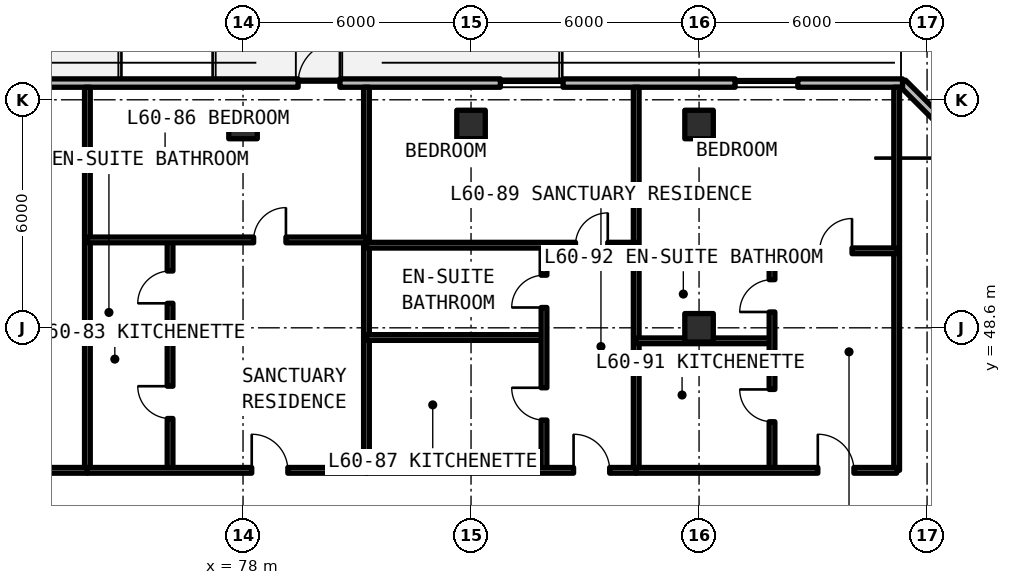
"""IFC4 building model, lengths in metres.
Left out: names, types, materials, properties, quantities, classifications, styles, units other than length and angle.
Written with IfcOpenShell. Run it as: python <this file> out.ifc"""

import sys

from ifc_helpers import new_model, si_unit, direction, frame, frame_2d, origin, origin_2d, place, context, subcontext, project, spatial, rectangle, extrude, element, fill, save


model = new_model("IFC4")
c1 = context("Model", 3, precision=1e-05, world=origin(), true_north=direction((0.0, 1.0)))
c2 = subcontext(c1, "Body", "Model", "MODEL_VIEW")
j1 = project(units=[si_unit("LENGTHUNIT", "METRE"), si_unit("PLANEANGLEUNIT", "RADIAN")], contexts=[c1])
p1 = place(None, origin())
s1 = spatial("IfcSite", under=j1, at=p1, CompositionType="ELEMENT")
p2 = place(p1, origin())
s2 = spatial("IfcBuilding", under=s1, at=p2, CompositionType="ELEMENT")
p3 = place(p2, frame((0.0, 0.0, 215.49)))
s3 = spatial("IfcBuildingStorey", under=s2, at=p3, CompositionType="ELEMENT", Elevation=215.49)
for number, where, z_axis, x_axis in (
    (1, (90.0, 48.6, 0.0), (0.0, 0.0, 1.0), (1.0, 0.0, 0.0)),
    (2, (78.0, 53.95, 0.0), (0.0, 0.0, 1.0), (1.0, 0.0, 0.0)),
    (3, (84.0, 53.95, 0.0), (0.0, 0.0, 1.0), (1.0, 0.0, 0.0)),
    (4, (90.0, 53.95, 0.0), (0.0, 0.0, 1.0), (1.0, 0.0, 0.0)),
):
    element("IfcColumn", number, at=place(p3, frame(where, z_axis=z_axis, x_axis=x_axis)), inside=s3, PredefinedType="COLUMN", context=c2, shape_type="SweptSolid", body=[
        extrude(rectangle(XDim=0.75, YDim=0.75, at=origin_2d()), origin(), (0.0, 0.0, 1.0), 3.63),
    ])
p4 = place(p3, frame((99.49, 50.904, 0.0), z_axis=(0.0, 0.0, 1.0), x_axis=(-0.707085909342, 0.707127652415, 0.0)))
e5 = element("IfcWall", 5, at=p4, inside=s3, PredefinedType="SOLIDWALL", context=c2, shape_type="SweptSolid", body=[
    extrude(rectangle(XDim=5.849, YDim=0.22, at=frame_2d((2.924, 0.0))), origin(), (0.0, 0.0, 1.0), 3.41),
])
p5 = place(p4, frame((1.224, 0.0, 0.78)))
e6 = element("IfcOpeningElement", 6, at=p5, cuts=e5, PredefinedType="OPENING", context=c2, shape_type="SweptSolid", body=[
    extrude(rectangle(XDim=3.4, YDim=1.66, at=frame_2d((1.7, 0.83))), frame((0.0, 0.12, 0.0), z_axis=(0.0, -1.0, 0.0), x_axis=(1.0, 0.0, 0.0)), (0.0, 0.0, 1.0), 0.24),
])
p6 = place(p3, frame((95.354, 55.04, 0.0), z_axis=(0.0, 0.0, 1.0), x_axis=(-1.0, 0.0, 0.0)))
e7 = element("IfcWall", 7, at=p6, inside=s3, PredefinedType="SOLIDWALL", context=c2, shape_type="SweptSolid", body=[
    extrude(rectangle(XDim=43.244, YDim=0.22, at=frame_2d((21.622, 0.0))), origin(), (0.0, 0.0, 1.0), 3.41),
])
p7 = place(p6, frame((37.204, 0.0, 0.0)))
e8 = element("IfcOpeningElement", 8, at=p7, cuts=e7, PredefinedType="OPENING", context=c2, shape_type="SweptSolid", body=[
    extrude(rectangle(XDim=1.1, YDim=2.15, at=frame_2d((0.55, 1.075))), frame((0.0, 0.12, 0.0), z_axis=(0.0, -1.0, 0.0), x_axis=(1.0, 0.0, 0.0)), (0.0, 0.0, 1.0), 0.24),
])
p8 = place(p6, frame((25.104, 0.0, 0.0)))
e9 = element("IfcOpeningElement", 9, at=p8, cuts=e7, PredefinedType="OPENING", context=c2, shape_type="SweptSolid", body=[
    extrude(rectangle(XDim=1.1, YDim=2.15, at=frame_2d((0.55, 1.075))), frame((0.0, 0.12, 0.0), z_axis=(0.0, -1.0, 0.0), x_axis=(1.0, 0.0, 0.0)), (0.0, 0.0, 1.0), 0.24),
])
p9 = place(p6, frame((14.804, 0.0, 0.0)))
e10 = element("IfcOpeningElement", 10, at=p9, cuts=e7, PredefinedType="OPENING", context=c2, shape_type="SweptSolid", body=[
    extrude(rectangle(XDim=1.1, YDim=2.15, at=frame_2d((0.55, 1.075))), frame((0.0, 0.12, 0.0), z_axis=(0.0, -1.0, 0.0), x_axis=(1.0, 0.0, 0.0)), (0.0, 0.0, 1.0), 0.24),
])
p10 = place(p6, frame((31.517, 0.0, 0.78)))
e11 = element("IfcOpeningElement", 11, at=p10, cuts=e7, PredefinedType="OPENING", context=c2, shape_type="SweptSolid", body=[
    extrude(rectangle(XDim=1.65, YDim=1.66, at=frame_2d((0.825, 0.83))), frame((0.0, 0.12, 0.0), z_axis=(0.0, -1.0, 0.0), x_axis=(1.0, 0.0, 0.0)), (0.0, 0.0, 1.0), 0.24),
])
p11 = place(p6, frame((8.932, 0.0, 0.78)))
e12 = element("IfcOpeningElement", 12, at=p11, cuts=e7, PredefinedType="OPENING", context=c2, shape_type="SweptSolid", body=[
    extrude(rectangle(XDim=1.65, YDim=1.66, at=frame_2d((0.825, 0.83))), frame((0.0, 0.12, 0.0), z_axis=(0.0, -1.0, 0.0), x_axis=(1.0, 0.0, 0.0)), (0.0, 0.0, 1.0), 0.24),
])
p12 = place(p6, frame((2.756, 0.0, 0.78)))
e13 = element("IfcOpeningElement", 13, at=p12, cuts=e7, PredefinedType="OPENING", context=c2, shape_type="SweptSolid", body=[
    extrude(rectangle(XDim=1.65, YDim=1.66, at=frame_2d((0.825, 0.83))), frame((0.0, 0.12, 0.0), z_axis=(0.0, -1.0, 0.0), x_axis=(1.0, 0.0, 0.0)), (0.0, 0.0, 1.0), 0.24),
])
for number, where, z_axis, x_axis in (
    (14, (95.2, 44.85, 0.0), (0.0, 0.0, 1.0), (0.0, 1.0, 0.0)),
    (15, (73.905, 44.85, 0.0), (0.0, 0.0, 1.0), (0.0, 1.0, 0.0)),
):
    element("IfcWall", number, at=place(p3, frame(where, z_axis=z_axis, x_axis=x_axis)), inside=s3, PredefinedType="SOLIDWALL", context=c2, shape_type="SweptSolid", body=[
        extrude(rectangle(XDim=10.08, YDim=0.15, at=frame_2d((5.04, 0.0))), origin(), (0.0, 0.0, 1.0), 2.63),
    ])
p13 = place(p3, frame((66.806, 44.85, 0.0), z_axis=(0.0, 0.0, 1.0), x_axis=(1.0, 0.0, 0.0)))
e16 = element("IfcWall", 16, at=p13, inside=s3, PredefinedType="SOLIDWALL", context=c2, shape_type="SweptSolid", body=[
    extrude(rectangle(XDim=7.098, YDim=0.15, at=frame_2d((3.549, 0.0))), origin(), (0.0, 0.0, 1.0), 2.63),
])
p14 = place(p13, frame((2.999, 0.0, 0.0)))
e17 = element("IfcOpeningElement", 17, at=p14, cuts=e16, PredefinedType="OPENING", context=c2, shape_type="SweptSolid", body=[
    extrude(rectangle(XDim=1.1, YDim=2.15, at=frame_2d((0.55, 1.075))), frame((0.0, 0.085, 0.0), z_axis=(0.0, -1.0, 0.0), x_axis=(1.0, 0.0, 0.0)), (0.0, 0.0, 1.0), 0.17),
])
p15 = place(p3, frame((81.248, 44.85, 0.0), z_axis=(0.0, 0.0, 1.0), x_axis=(0.0, 1.0, 0.0)))
e18 = element("IfcWall", 18, at=p15, inside=s3, PredefinedType="SOLIDWALL", context=c2, shape_type="SweptSolid", body=[
    extrude(rectangle(XDim=10.08, YDim=0.15, at=frame_2d((5.04, 0.0))), origin(), (0.0, 0.0, 1.0), 2.63),
])
p16 = place(p3, frame((73.905, 48.427, 0.0), z_axis=(0.0, 0.0, 1.0), x_axis=(1.0, 0.0, 0.0)))
e19 = element("IfcWall", 19, at=p16, inside=s3, PredefinedType="PARTITIONING", context=c2, shape_type="SweptSolid", body=[
    extrude(rectangle(XDim=2.175, YDim=0.15, at=frame_2d((1.088, 0.0))), origin(), (0.0, 0.0, 1.0), 2.63),
])
p17 = place(p3, frame((76.08, 44.85, 0.0), z_axis=(0.0, 0.0, 1.0), x_axis=(0.0, 1.0, 0.0)))
e20 = element("IfcWall", 20, at=p17, inside=s3, PredefinedType="PARTITIONING", context=c2, shape_type="SweptSolid", body=[
    extrude(rectangle(XDim=6.062, YDim=0.15, at=frame_2d((3.031, 0.0))), origin(), (0.0, 0.0, 1.0), 2.63),
])
p18 = place(p17, frame((1.364, 0.0, 0.0)))
e21 = element("IfcOpeningElement", 21, at=p18, cuts=e20, PredefinedType="OPENING", context=c2, shape_type="SweptSolid", body=[
    extrude(rectangle(XDim=0.85, YDim=2.1, at=frame_2d((0.425, 1.05))), frame((0.0, 0.085, 0.0), z_axis=(0.0, -1.0, 0.0), x_axis=(1.0, 0.0, 0.0)), (0.0, 0.0, 1.0), 0.17),
])
p19 = place(p17, frame((4.395, 0.0, 0.0)))
e22 = element("IfcOpeningElement", 22, at=p19, cuts=e20, PredefinedType="OPENING", context=c2, shape_type="SweptSolid", body=[
    extrude(rectangle(XDim=0.85, YDim=2.1, at=frame_2d((0.425, 1.05))), frame((0.0, 0.085, 0.0), z_axis=(0.0, -1.0, 0.0), x_axis=(1.0, 0.0, 0.0)), (0.0, 0.0, 1.0), 0.17),
])
p20 = place(p3, frame((73.905, 50.913, 0.0), z_axis=(0.0, 0.0, 1.0), x_axis=(1.0, 0.0, 0.0)))
e23 = element("IfcWall", 23, at=p20, inside=s3, PredefinedType="PARTITIONING", context=c2, shape_type="SweptSolid", body=[
    extrude(rectangle(XDim=7.343, YDim=0.15, at=frame_2d((3.672, 0.0))), origin(), (0.0, 0.0, 1.0), 2.63),
])
p21 = place(p20, frame((4.374, 0.0, 0.0)))
e24 = element("IfcOpeningElement", 24, at=p21, cuts=e23, PredefinedType="OPENING", context=c2, shape_type="SweptSolid", body=[
    extrude(rectangle(XDim=0.85, YDim=2.1, at=frame_2d((0.425, 1.05))), frame((0.0, 0.085, 0.0), z_axis=(0.0, -1.0, 0.0), x_axis=(1.0, 0.0, 0.0)), (0.0, 0.0, 1.0), 0.17),
])
p22 = place(p3, frame((73.905, 44.85, 0.0), z_axis=(0.0, 0.0, 1.0), x_axis=(1.0, 0.0, 0.0)))
e25 = element("IfcWall", 25, at=p22, inside=s3, PredefinedType="SOLIDWALL", context=c2, shape_type="SweptSolid", body=[
    extrude(rectangle(XDim=7.343, YDim=0.15, at=frame_2d((3.672, 0.0))), origin(), (0.0, 0.0, 1.0), 2.63),
])
p23 = place(p22, frame((4.324, 0.0, 0.0)))
e26 = element("IfcOpeningElement", 26, at=p23, cuts=e25, PredefinedType="OPENING", context=c2, shape_type="SweptSolid", body=[
    extrude(rectangle(XDim=0.95, YDim=2.15, at=frame_2d((0.475, 1.075))), frame((0.0, 0.085, 0.0), z_axis=(0.0, -1.0, 0.0), x_axis=(1.0, 0.0, 0.0)), (0.0, 0.0, 1.0), 0.17),
])
p24 = place(p3, frame((88.346, 44.85, 0.0), z_axis=(0.0, 0.0, 1.0), x_axis=(0.0, 1.0, 0.0)))
e27 = element("IfcWall", 27, at=p24, inside=s3, PredefinedType="SOLIDWALL", context=c2, shape_type="SweptSolid", body=[
    extrude(rectangle(XDim=10.08, YDim=0.15, at=frame_2d((5.04, 0.0))), origin(), (0.0, 0.0, 1.0), 2.63),
])
p25 = place(p3, frame((81.248, 48.345, 0.0), z_axis=(0.0, 0.0, 1.0), x_axis=(1.0, 0.0, 0.0)))
e28 = element("IfcWall", 28, at=p25, inside=s3, PredefinedType="PARTITIONING", context=c2, shape_type="SweptSolid", body=[
    extrude(rectangle(XDim=4.672, YDim=0.15, at=frame_2d((2.336, 0.0))), origin(), (0.0, 0.0, 1.0), 2.63),
])
p26 = place(p3, frame((85.92, 44.85, 0.0), z_axis=(0.0, 0.0, 1.0), x_axis=(0.0, 1.0, 0.0)))
e29 = element("IfcWall", 29, at=p26, inside=s3, PredefinedType="PARTITIONING", context=c2, shape_type="SweptSolid", body=[
    extrude(rectangle(XDim=5.924, YDim=0.15, at=frame_2d((2.962, 0.0))), origin(), (0.0, 0.0, 1.0), 2.63),
])
p27 = place(p26, frame((1.323, 0.0, 0.0)))
e30 = element("IfcOpeningElement", 30, at=p27, cuts=e29, PredefinedType="OPENING", context=c2, shape_type="SweptSolid", body=[
    extrude(rectangle(XDim=0.85, YDim=2.1, at=frame_2d((0.425, 1.05))), frame((0.0, 0.085, 0.0), z_axis=(0.0, -1.0, 0.0), x_axis=(1.0, 0.0, 0.0)), (0.0, 0.0, 1.0), 0.17),
])
p28 = place(p26, frame((4.285, 0.0, 0.0)))
e31 = element("IfcOpeningElement", 31, at=p28, cuts=e29, PredefinedType="OPENING", context=c2, shape_type="SweptSolid", body=[
    extrude(rectangle(XDim=0.85, YDim=2.1, at=frame_2d((0.425, 1.05))), frame((0.0, 0.085, 0.0), z_axis=(0.0, -1.0, 0.0), x_axis=(1.0, 0.0, 0.0)), (0.0, 0.0, 1.0), 0.17),
])
p29 = place(p3, frame((81.248, 50.774, 0.0), z_axis=(0.0, 0.0, 1.0), x_axis=(1.0, 0.0, 0.0)))
e32 = element("IfcWall", 32, at=p29, inside=s3, PredefinedType="PARTITIONING", context=c2, shape_type="SweptSolid", body=[
    extrude(rectangle(XDim=7.098, YDim=0.15, at=frame_2d((3.549, 0.0))), origin(), (0.0, 0.0, 1.0), 2.63),
])
p30 = place(p29, frame((5.5, 0.0, 0.0)))
e33 = element("IfcOpeningElement", 33, at=p30, cuts=e32, PredefinedType="OPENING", context=c2, shape_type="SweptSolid", body=[
    extrude(rectangle(XDim=0.85, YDim=2.1, at=frame_2d((0.425, 1.05))), frame((0.0, 0.085, 0.0), z_axis=(0.0, -1.0, 0.0), x_axis=(1.0, 0.0, 0.0)), (0.0, 0.0, 1.0), 0.17),
])
p31 = place(p3, frame((81.248, 44.85, 0.0), z_axis=(0.0, 0.0, 1.0), x_axis=(1.0, 0.0, 0.0)))
e34 = element("IfcWall", 34, at=p31, inside=s3, PredefinedType="SOLIDWALL", context=c2, shape_type="SweptSolid", body=[
    extrude(rectangle(XDim=7.098, YDim=0.15, at=frame_2d((3.549, 0.0))), origin(), (0.0, 0.0, 1.0), 2.63),
])
p32 = place(p31, frame((5.45, 0.0, 0.0)))
e35 = element("IfcOpeningElement", 35, at=p32, cuts=e34, PredefinedType="OPENING", context=c2, shape_type="SweptSolid", body=[
    extrude(rectangle(XDim=0.95, YDim=2.15, at=frame_2d((0.475, 1.075))), frame((0.0, 0.085, 0.0), z_axis=(0.0, -1.0, 0.0), x_axis=(1.0, 0.0, 0.0)), (0.0, 0.0, 1.0), 0.17),
])
p33 = place(p3, frame((88.346, 48.258, 0.0), z_axis=(0.0, 0.0, 1.0), x_axis=(1.0, 0.0, 0.0)))
e36 = element("IfcWall", 36, at=p33, inside=s3, PredefinedType="PARTITIONING", context=c2, shape_type="SweptSolid", body=[
    extrude(rectangle(XDim=3.573, YDim=0.15, at=frame_2d((1.787, 0.0))), origin(), (0.0, 0.0, 1.0), 2.63),
])
p34 = place(p3, frame((91.92, 44.85, 0.0), z_axis=(0.0, 0.0, 1.0), x_axis=(0.0, 1.0, 0.0)))
e37 = element("IfcWall", 37, at=p34, inside=s3, PredefinedType="PARTITIONING", context=c2, shape_type="SweptSolid", body=[
    extrude(rectangle(XDim=5.776, YDim=0.15, at=frame_2d((2.888, 0.0))), origin(), (0.0, 0.0, 1.0), 2.63),
])
p35 = place(p34, frame((1.279, 0.0, 0.0)))
e38 = element("IfcOpeningElement", 38, at=p35, cuts=e37, PredefinedType="OPENING", context=c2, shape_type="SweptSolid", body=[
    extrude(rectangle(XDim=0.85, YDim=2.1, at=frame_2d((0.425, 1.05))), frame((0.0, 0.085, 0.0), z_axis=(0.0, -1.0, 0.0), x_axis=(1.0, 0.0, 0.0)), (0.0, 0.0, 1.0), 0.17),
])
p36 = place(p34, frame((4.167, 0.0, 0.0)))
e39 = element("IfcOpeningElement", 39, at=p36, cuts=e37, PredefinedType="OPENING", context=c2, shape_type="SweptSolid", body=[
    extrude(rectangle(XDim=0.85, YDim=2.1, at=frame_2d((0.425, 1.05))), frame((0.0, 0.085, 0.0), z_axis=(0.0, -1.0, 0.0), x_axis=(1.0, 0.0, 0.0)), (0.0, 0.0, 1.0), 0.17),
])
p37 = place(p3, frame((88.346, 50.626, 0.0), z_axis=(0.0, 0.0, 1.0), x_axis=(1.0, 0.0, 0.0)))
e40 = element("IfcWall", 40, at=p37, inside=s3, PredefinedType="PARTITIONING", context=c2, shape_type="SweptSolid", body=[
    extrude(rectangle(XDim=6.854, YDim=0.15, at=frame_2d((3.427, 0.0))), origin(), (0.0, 0.0, 1.0), 2.63),
])
p38 = place(p37, frame((4.829, 0.0, 0.0)))
e41 = element("IfcOpeningElement", 41, at=p38, cuts=e40, PredefinedType="OPENING", context=c2, shape_type="SweptSolid", body=[
    extrude(rectangle(XDim=0.85, YDim=2.1, at=frame_2d((0.425, 1.05))), frame((0.0, 0.085, 0.0), z_axis=(0.0, -1.0, 0.0), x_axis=(1.0, 0.0, 0.0)), (0.0, 0.0, 1.0), 0.17),
])
p39 = place(p3, frame((88.346, 44.85, 0.0), z_axis=(0.0, 0.0, 1.0), x_axis=(1.0, 0.0, 0.0)))
e42 = element("IfcWall", 42, at=p39, inside=s3, PredefinedType="SOLIDWALL", context=c2, shape_type="SweptSolid", body=[
    extrude(rectangle(XDim=6.854, YDim=0.15, at=frame_2d((3.427, 0.0))), origin(), (0.0, 0.0, 1.0), 2.63),
])
p40 = place(p39, frame((4.779, 0.0, 0.0)))
e43 = element("IfcOpeningElement", 43, at=p40, cuts=e42, PredefinedType="OPENING", context=c2, shape_type="SweptSolid", body=[
    extrude(rectangle(XDim=0.95, YDim=2.15, at=frame_2d((0.475, 1.075))), frame((0.0, 0.085, 0.0), z_axis=(0.0, -1.0, 0.0), x_axis=(1.0, 0.0, 0.0)), (0.0, 0.0, 1.0), 0.17),
])
p41 = place(p9, frame((1.1, 0.0, 0.0), z_axis=(0.0, 0.0, 1.0), x_axis=(-1.0, 0.0, 0.0)))
e44 = element("IfcDoor", 44, at=p41, inside=s3, OperationType="SINGLE_SWING_RIGHT", PredefinedType="DOOR", context=c2, shape_type="SweptSolid", body=[
    extrude(rectangle(XDim=1.1, YDim=2.15, at=frame_2d((0.55, 1.075))), frame((0.0, 0.025, 0.0), z_axis=(0.0, -1.0, 0.0), x_axis=(1.0, 0.0, 0.0)), (0.0, 0.0, 1.0), 0.05),
])
fill(e10, e44)
p42 = place(p11, origin())
e45 = element("IfcWindow", 45, at=p42, inside=s3, PartitioningType="SINGLE_PANEL", PredefinedType="WINDOW", context=c2, shape_type="SweptSolid", body=[
    extrude(rectangle(XDim=1.65, YDim=1.66, at=frame_2d((0.825, 0.83))), frame((0.0, 0.03, 0.0), z_axis=(0.0, -1.0, 0.0), x_axis=(1.0, 0.0, 0.0)), (0.0, 0.0, 1.0), 0.06),
])
fill(e12, e45)
p43 = place(p12, origin())
e46 = element("IfcWindow", 46, at=p43, inside=s3, PartitioningType="SINGLE_PANEL", PredefinedType="WINDOW", context=c2, shape_type="SweptSolid", body=[
    extrude(rectangle(XDim=1.65, YDim=1.66, at=frame_2d((0.825, 0.83))), frame((0.0, 0.03, 0.0), z_axis=(0.0, -1.0, 0.0), x_axis=(1.0, 0.0, 0.0)), (0.0, 0.0, 1.0), 0.06),
])
fill(e13, e46)
p44 = place(p18, origin())
e47 = element("IfcDoor", 47, at=p44, inside=s3, OperationType="SINGLE_SWING_RIGHT", PredefinedType="DOOR", context=c2, shape_type="SweptSolid", body=[
    extrude(rectangle(XDim=0.85, YDim=2.1, at=frame_2d((0.425, 1.05))), frame((0.0, 0.025, 0.0), z_axis=(0.0, -1.0, 0.0), x_axis=(1.0, 0.0, 0.0)), (0.0, 0.0, 1.0), 0.05),
])
fill(e21, e47)
p45 = place(p19, origin())
e48 = element("IfcDoor", 48, at=p45, inside=s3, OperationType="SINGLE_SWING_LEFT", PredefinedType="DOOR", context=c2, shape_type="SweptSolid", body=[
    extrude(rectangle(XDim=0.85, YDim=2.1, at=frame_2d((0.425, 1.05))), frame((0.0, 0.025, 0.0), z_axis=(0.0, -1.0, 0.0), x_axis=(1.0, 0.0, 0.0)), (0.0, 0.0, 1.0), 0.05),
])
fill(e22, e48)
p46 = place(p21, origin())
e49 = element("IfcDoor", 49, at=p46, inside=s3, OperationType="SINGLE_SWING_RIGHT", PredefinedType="DOOR", context=c2, shape_type="SweptSolid", body=[
    extrude(rectangle(XDim=0.85, YDim=2.1, at=frame_2d((0.425, 1.05))), frame((0.0, 0.025, 0.0), z_axis=(0.0, -1.0, 0.0), x_axis=(1.0, 0.0, 0.0)), (0.0, 0.0, 1.0), 0.05),
])
fill(e24, e49)
p47 = place(p23, origin())
e50 = element("IfcDoor", 50, at=p47, inside=s3, OperationType="SINGLE_SWING_LEFT", PredefinedType="DOOR", context=c2, shape_type="SweptSolid", body=[
    extrude(rectangle(XDim=0.95, YDim=2.15, at=frame_2d((0.475, 1.075))), frame((0.0, 0.025, 0.0), z_axis=(0.0, -1.0, 0.0), x_axis=(1.0, 0.0, 0.0)), (0.0, 0.0, 1.0), 0.05),
])
fill(e26, e50)
p48 = place(p27, origin())
e51 = element("IfcDoor", 51, at=p48, inside=s3, OperationType="SINGLE_SWING_RIGHT", PredefinedType="DOOR", context=c2, shape_type="SweptSolid", body=[
    extrude(rectangle(XDim=0.85, YDim=2.1, at=frame_2d((0.425, 1.05))), frame((0.0, 0.025, 0.0), z_axis=(0.0, -1.0, 0.0), x_axis=(1.0, 0.0, 0.0)), (0.0, 0.0, 1.0), 0.05),
])
fill(e30, e51)
p49 = place(p28, origin())
e52 = element("IfcDoor", 52, at=p49, inside=s3, OperationType="SINGLE_SWING_LEFT", PredefinedType="DOOR", context=c2, shape_type="SweptSolid", body=[
    extrude(rectangle(XDim=0.85, YDim=2.1, at=frame_2d((0.425, 1.05))), frame((0.0, 0.025, 0.0), z_axis=(0.0, -1.0, 0.0), x_axis=(1.0, 0.0, 0.0)), (0.0, 0.0, 1.0), 0.05),
])
fill(e31, e52)
p50 = place(p30, origin())
e53 = element("IfcDoor", 53, at=p50, inside=s3, OperationType="SINGLE_SWING_RIGHT", PredefinedType="DOOR", context=c2, shape_type="SweptSolid", body=[
    extrude(rectangle(XDim=0.85, YDim=2.1, at=frame_2d((0.425, 1.05))), frame((0.0, 0.025, 0.0), z_axis=(0.0, -1.0, 0.0), x_axis=(1.0, 0.0, 0.0)), (0.0, 0.0, 1.0), 0.05),
])
fill(e33, e53)
p51 = place(p32, origin())
e54 = element("IfcDoor", 54, at=p51, inside=s3, OperationType="SINGLE_SWING_LEFT", PredefinedType="DOOR", context=c2, shape_type="SweptSolid", body=[
    extrude(rectangle(XDim=0.95, YDim=2.15, at=frame_2d((0.475, 1.075))), frame((0.0, 0.025, 0.0), z_axis=(0.0, -1.0, 0.0), x_axis=(1.0, 0.0, 0.0)), (0.0, 0.0, 1.0), 0.05),
])
fill(e35, e54)
p52 = place(p35, origin())
e55 = element("IfcDoor", 55, at=p52, inside=s3, OperationType="SINGLE_SWING_RIGHT", PredefinedType="DOOR", context=c2, shape_type="SweptSolid", body=[
    extrude(rectangle(XDim=0.85, YDim=2.1, at=frame_2d((0.425, 1.05))), frame((0.0, 0.025, 0.0), z_axis=(0.0, -1.0, 0.0), x_axis=(1.0, 0.0, 0.0)), (0.0, 0.0, 1.0), 0.05),
])
fill(e38, e55)
p53 = place(p36, origin())
e56 = element("IfcDoor", 56, at=p53, inside=s3, OperationType="SINGLE_SWING_LEFT", PredefinedType="DOOR", context=c2, shape_type="SweptSolid", body=[
    extrude(rectangle(XDim=0.85, YDim=2.1, at=frame_2d((0.425, 1.05))), frame((0.0, 0.025, 0.0), z_axis=(0.0, -1.0, 0.0), x_axis=(1.0, 0.0, 0.0)), (0.0, 0.0, 1.0), 0.05),
])
fill(e39, e56)
p54 = place(p38, origin())
e57 = element("IfcDoor", 57, at=p54, inside=s3, OperationType="SINGLE_SWING_RIGHT", PredefinedType="DOOR", context=c2, shape_type="SweptSolid", body=[
    extrude(rectangle(XDim=0.85, YDim=2.1, at=frame_2d((0.425, 1.05))), frame((0.0, 0.025, 0.0), z_axis=(0.0, -1.0, 0.0), x_axis=(1.0, 0.0, 0.0)), (0.0, 0.0, 1.0), 0.05),
])
fill(e41, e57)
p55 = place(p40, origin())
e58 = element("IfcDoor", 58, at=p55, inside=s3, OperationType="SINGLE_SWING_LEFT", PredefinedType="DOOR", context=c2, shape_type="SweptSolid", body=[
    extrude(rectangle(XDim=0.95, YDim=2.15, at=frame_2d((0.475, 1.075))), frame((0.0, 0.025, 0.0), z_axis=(0.0, -1.0, 0.0), x_axis=(1.0, 0.0, 0.0)), (0.0, 0.0, 1.0), 0.05),
])
fill(e43, e58)
save(model, sys.argv[1])
